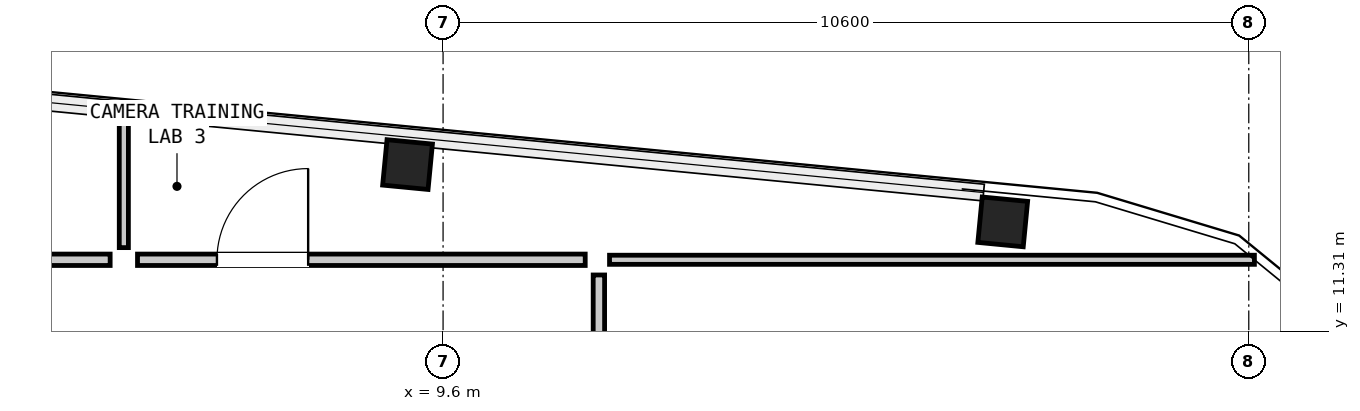
"""IFC4 building model, lengths in metres.
Left out: names, types, materials, properties, quantities, classifications, styles, units other than length and angle.
Written with IfcOpenShell. Run it as: python <this file> out.ifc"""

import sys

from ifc_helpers import new_model, si_unit, direction, frame, frame_2d, origin, origin_2d, place, context, subcontext, project, spatial, rectangle, hollow_rectangle, extrude, element, fill, save


model = new_model("IFC4")
c1 = context("Model", 3, precision=1e-05, world=origin(), true_north=direction((0.0, 1.0)))
c2 = subcontext(c1, "Body", "Model", "MODEL_VIEW")
j1 = project(units=[si_unit("LENGTHUNIT", "METRE"), si_unit("PLANEANGLEUNIT", "RADIAN")], contexts=[c1])
p1 = place(None, origin())
s1 = spatial("IfcSite", under=j1, at=p1, CompositionType="ELEMENT")
p2 = place(p1, origin())
s2 = spatial("IfcBuilding", under=s1, at=p2, CompositionType="ELEMENT")
p3 = place(p2, frame((0.0, 0.0, 270.3)))
s3 = spatial("IfcBuildingStorey", under=s2, at=p3, CompositionType="ELEMENT", Elevation=270.3)
for number, where, z_axis, x_axis in (
    (1, (16.963, 12.749, 0.0), (0.0, 0.0, 1.0), (0.995, -0.096, 0.0)),
    (2, (9.133, 13.502, 0.0), (0.0, 0.0, 1.0), (0.995, -0.096, 0.0)),
):
    element("IfcColumn", number, at=place(p3, frame(where, z_axis=z_axis, x_axis=x_axis)), inside=s3, PredefinedType="COLUMN", context=c2, shape_type="SweptSolid", body=[
        extrude(hollow_rectangle(XDim=0.6, YDim=0.6, WallThickness=0.04, at=origin_2d()), origin(), (0.0, 0.0, 1.0), 3.05),
    ])
p4 = place(p3, frame((11.79, 12.25, 0.0), z_axis=(0.0, 0.0, 1.0), x_axis=(1.0, 0.0, 0.0)))
e3 = element("IfcWall", 3, at=p4, inside=s3, PredefinedType="PARTITIONING", context=c2, shape_type="SweptSolid", body=[
    extrude(rectangle(XDim=8.484, YDim=0.12, at=frame_2d((4.242, 0.0))), origin(), (0.0, 0.0, 1.0), 2.86),
])
p5 = place(p3, frame((5.4, 12.41, 0.0), z_axis=(0.0, 0.0, 1.0), x_axis=(0.0, 1.0, 0.0)))
e4 = element("IfcWall", 4, at=p5, inside=s3, PredefinedType="PARTITIONING", context=c2, shape_type="SweptSolid", body=[
    extrude(rectangle(XDim=1.834, YDim=0.12, at=frame_2d((0.917, 0.0))), origin(), (0.0, 0.0, 1.0), 2.86),
])
p6 = place(p3, frame((-5.22, 12.25, 0.0), z_axis=(0.0, 0.0, 1.0), x_axis=(1.0, 0.0, 0.0)))
e5 = element("IfcWall", 5, at=p6, inside=s3, PredefinedType="PARTITIONING", context=c2, shape_type="SweptSolid", body=[
    extrude(rectangle(XDim=10.44, YDim=0.15, at=frame_2d((5.22, 0.0))), origin(), (0.0, 0.0, 1.0), 2.86),
])
p7 = place(p6, frame((4.62, 0.0, 0.0)))
e6 = element("IfcOpeningElement", 6, at=p7, cuts=e5, PredefinedType="OPENING", context=c2, shape_type="SweptSolid", body=[
    extrude(rectangle(XDim=1.2, YDim=2.1, at=frame_2d((0.6, 1.05))), frame((0.0, 0.087, 0.0), z_axis=(0.0, -1.0, 0.0), x_axis=(1.0, 0.0, 0.0)), (0.0, 0.0, 1.0), 0.174),
])
p8 = place(p3, frame((5.58, 12.25, 0.0), z_axis=(0.0, 0.0, 1.0), x_axis=(1.0, 0.0, 0.0)))
e7 = element("IfcWall", 7, at=p8, inside=s3, PredefinedType="PARTITIONING", context=c2, shape_type="SweptSolid", body=[
    extrude(rectangle(XDim=5.89, YDim=0.15, at=frame_2d((2.945, 0.0))), origin(), (0.0, 0.0, 1.0), 2.86),
])
p9 = place(p8, frame((1.045, 0.0, 0.0)))
e8 = element("IfcOpeningElement", 8, at=p9, cuts=e7, PredefinedType="OPENING", context=c2, shape_type="SweptSolid", body=[
    extrude(rectangle(XDim=1.2, YDim=2.1, at=frame_2d((0.6, 1.05))), frame((0.0, 0.087, 0.0), z_axis=(0.0, -1.0, 0.0), x_axis=(1.0, 0.0, 0.0)), (0.0, 0.0, 1.0), 0.174),
])
p10 = place(p3, frame((11.65, 3.8, 0.0), z_axis=(0.0, 0.0, 1.0), x_axis=(0.0, 1.0, 0.0)))
e9 = element("IfcWall", 9, at=p10, inside=s3, PredefinedType="PARTITIONING", context=c2, shape_type="SweptSolid", body=[
    extrude(rectangle(XDim=8.25, YDim=0.15, at=frame_2d((4.125, 0.0))), origin(), (0.0, 0.0, 1.0), 2.86),
])
p11 = place(p10, frame((3.65, 0.0, 0.0)))
e10 = element("IfcOpeningElement", 10, at=p11, cuts=e9, PredefinedType="OPENING", context=c2, shape_type="SweptSolid", body=[
    extrude(rectangle(XDim=0.95, YDim=2.1, at=frame_2d((0.475, 1.05))), frame((0.0, 0.087, 0.0), z_axis=(0.0, -1.0, 0.0), x_axis=(1.0, 0.0, 0.0)), (0.0, 0.0, 1.0), 0.174),
])
p12 = place(p9, origin())
e11 = element("IfcDoor", 11, at=p12, inside=s3, OperationType="SINGLE_SWING_RIGHT", PredefinedType="DOOR", context=c2, shape_type="SweptSolid", body=[
    extrude(rectangle(XDim=1.2, YDim=2.1, at=frame_2d((0.6, 1.05))), frame((0.0, 0.025, 0.0), z_axis=(0.0, -1.0, 0.0), x_axis=(1.0, 0.0, 0.0)), (0.0, 0.0, 1.0), 0.05),
])
fill(e8, e11)
save(model, sys.argv[1])
